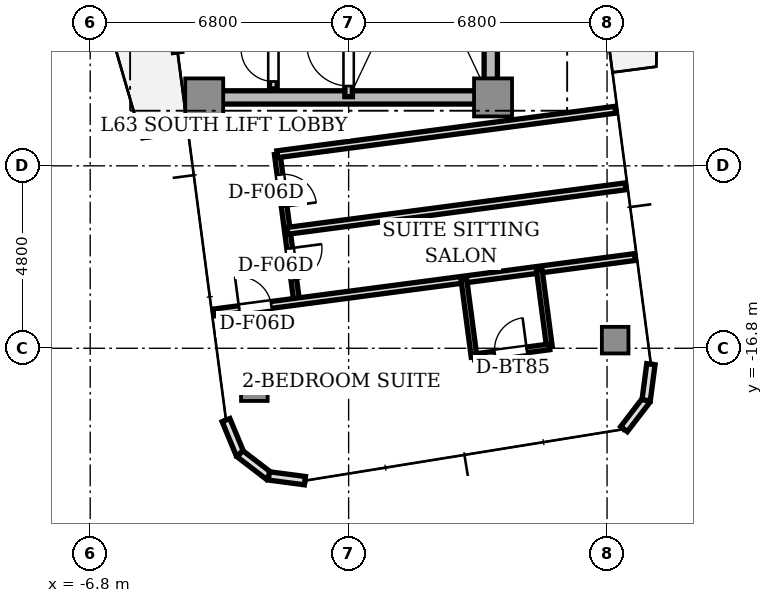
"""IFC4 building model, lengths in metres.
Left out: names, types, materials, properties, quantities, classifications, styles, units other than length and angle.
Written with IfcOpenShell. Run it as: python <this file> out.ifc"""

import sys

from ifc_helpers import new_model, si_unit, direction, frame, frame_2d, origin, origin_2d, place, context, subcontext, project, spatial, rectangle, extrude, source, transform, mapped, element, fill, save


model = new_model("IFC4")
c1 = context("Model", 3, precision=1e-05, world=origin(), true_north=direction((0.0, 1.0)))
c2 = subcontext(c1, "Body", "Model", "MODEL_VIEW")
j1 = project(units=[si_unit("LENGTHUNIT", "METRE"), si_unit("PLANEANGLEUNIT", "RADIAN")], contexts=[c1])
p1 = place(None, origin())
s1 = spatial("IfcSite", under=j1, at=p1, CompositionType="ELEMENT")
p2 = place(p1, origin())
s2 = spatial("IfcBuilding", under=s1, at=p2, CompositionType="ELEMENT")
p3 = place(p2, frame((0.0, 0.0, 226.6)))
s3 = spatial("IfcBuildingStorey", under=s2, at=p3, CompositionType="ELEMENT", Elevation=226.6)
p4 = place(p3, frame((-3.55, -10.2, 0.0), z_axis=(0.0, 0.0, 1.0), x_axis=(1.0, 0.0, 0.0)))
e1 = element("IfcWall", 1, at=p4, inside=s3, PredefinedType="SHEAR", context=c2, shape_type="SweptSolid", body=[
    extrude(rectangle(XDim=7.1, YDim=0.35, at=frame_2d((3.55, 0.0))), origin(), (0.0, 0.0, 1.0), 3.05),
])
p5 = place(p3, frame((3.74, -9.75, 0.0), z_axis=(0.0, 0.0, 1.0), x_axis=(0.0, 1.0, 0.0)))
e2 = element("IfcWall", 2, at=p5, inside=s3, PredefinedType="SHEAR", context=c2, shape_type="SweptSolid", body=[
    extrude(rectangle(XDim=6.9, YDim=0.35, at=frame_2d((3.45, 0.0))), origin(), (0.0, 0.0, 1.0), 3.05),
])
m1 = source(origin(), c2, "Body", "SweptSolid", [
    extrude(rectangle(XDim=1.0, YDim=1.0, at=origin_2d()), origin(), (0.0, 0.0, 1.0), 3.05),
])
for number, where, z_axis, x_axis in (
    (3, (-3.8, -10.2, 0.0), (0.0, 0.0, 1.0), (1.0, 0.0, 0.0)),
    (4, (3.8, -10.2, 0.0), (0.0, 0.0, 1.0), (1.0, 0.0, 0.0)),
):
    element("IfcColumn", number, at=place(p3, frame(where, z_axis=z_axis, x_axis=x_axis)), inside=s3, PredefinedType="COLUMN", context=c2, shape_type="MappedRepresentation", body=[
        mapped(m1, transform((0.0, 0.0, 0.0), scale=1.0)),
    ])
m2 = source(origin(), c2, "Body", "SweptSolid", [
    extrude(rectangle(XDim=0.7, YDim=0.7, at=origin_2d()), origin(), (0.0, 0.0, 1.0), 3.05),
])
for number, where, z_axis, x_axis in (
    (5, (-2.481, -17.836, 0.0), (0.0, 0.0, 1.0), (1.0, 0.0, 0.0)),
    (6, (7.013, -16.586, 0.0), (0.0, 0.0, 1.0), (1.0, 0.0, 0.0)),
):
    element("IfcColumn", number, at=place(p3, frame(where, z_axis=z_axis, x_axis=x_axis)), inside=s3, PredefinedType="COLUMN", context=c2, shape_type="MappedRepresentation", body=[
        mapped(m2, transform((0.0, 0.0, 0.0), scale=1.0)),
    ])
p6 = place(p3, frame((-3.226, -18.691, 0.0), z_axis=(0.0, 0.0, 1.0), x_axis=(0.382441868588, -0.923979554509, 0.0)))
e7 = element("IfcWall", 7, at=p6, inside=s3, PredefinedType="STANDARD", context=c2, shape_type="SweptSolid", body=[
    extrude(rectangle(XDim=0.958, YDim=0.22, at=frame_2d((0.479, 0.0))), origin(), (0.0, 0.0, 1.0), 3.05),
])
p7 = place(p3, frame((-2.86, -19.576, 0.0), z_axis=(0.0, 0.0, 1.0), x_axis=(0.79343813584, -0.60865090536, 0.0)))
e8 = element("IfcWall", 8, at=p7, inside=s3, PredefinedType="STANDARD", context=c2, shape_type="SweptSolid", body=[
    extrude(rectangle(XDim=0.958, YDim=0.22, at=frame_2d((0.479, 0.0))), origin(), (0.0, 0.0, 1.0), 3.05),
])
for number, where, z_axis, x_axis in (
    (9, (-2.1, -20.159, 0.0), (0.0, 0.0, 1.0), (0.991, -0.131, 0.0)),
    (10, (7.246, -18.928, 0.0), (0.0, 0.0, 1.0), (0.609, 0.793, 0.0)),
):
    element("IfcWall", number, at=place(p3, frame(where, z_axis=z_axis, x_axis=x_axis)), inside=s3, PredefinedType="STANDARD", context=c2, shape_type="SweptSolid", body=[
        extrude(rectangle(XDim=0.958, YDim=0.22, at=frame_2d((0.479, 0.0))), origin(), (0.0, 0.0, 1.0), 3.05),
    ])
p8 = place(p3, frame((7.829, -18.169, 0.0), z_axis=(0.0, 0.0, 1.0), x_axis=(0.130527053476, 0.991444747987, 0.0)))
e11 = element("IfcWall", 11, at=p8, inside=s3, PredefinedType="STANDARD", context=c2, shape_type="SweptSolid", body=[
    extrude(rectangle(XDim=0.958, YDim=0.22, at=frame_2d((0.479, 0.0))), origin(), (0.0, 0.0, 1.0), 3.05),
])
p9 = place(p3, frame((0.0, -10.18, 0.0), z_axis=(0.0, 0.0, 1.0), x_axis=(0.0, 1.0, 0.0)))
e12 = element("IfcWall", 12, at=p9, inside=s3, PredefinedType="SOLIDWALL", context=c2, shape_type="SweptSolid", body=[
    extrude(rectangle(XDim=7.68, YDim=0.2, at=frame_2d((3.84, 0.0))), origin(), (0.0, 0.0, 1.0), 3.05),
])
p10 = place(p9, frame((0.28, 0.0, 0.0)))
e13 = element("IfcOpeningElement", 13, at=p10, cuts=e12, PredefinedType="OPENING", context=c2, shape_type="SweptSolid", body=[
    extrude(rectangle(XDim=1.1, YDim=2.15, at=frame_2d((0.55, 1.075))), frame((0.0, 0.11, 0.0), z_axis=(0.0, -1.0, 0.0), x_axis=(1.0, 0.0, 0.0)), (0.0, 0.0, 1.0), 0.22),
])
p11 = place(p3, frame((-1.98, -9.98, 0.0), z_axis=(0.0, 0.0, 1.0), x_axis=(0.0, 1.0, 0.0)))
e14 = element("IfcWall", 14, at=p11, inside=s3, PredefinedType="SOLIDWALL", context=c2, shape_type="SweptSolid", body=[
    extrude(rectangle(XDim=4.66, YDim=0.2, at=frame_2d((2.33, 0.0))), origin(), (0.0, 0.0, 1.0), 2.6),
])
p12 = place(p11, frame((0.2, 0.0, 0.0)))
e15 = element("IfcOpeningElement", 15, at=p12, cuts=e14, PredefinedType="OPENING", context=c2, shape_type="SweptSolid", body=[
    extrude(rectangle(XDim=0.85, YDim=2.1, at=frame_2d((0.425, 1.05))), frame((0.0, 0.11, 0.0), z_axis=(0.0, -1.0, 0.0), x_axis=(1.0, 0.0, 0.0)), (0.0, 0.0, 1.0), 0.22),
])
p13 = place(p3, frame((-1.877, -11.695, 0.0), z_axis=(0.0, 0.0, 1.0), x_axis=(0.130494890856, -0.991448981774, 0.0)))
e16 = element("IfcWall", 16, at=p13, inside=s3, PredefinedType="PARTITIONING", context=c2, shape_type="SweptSolid", body=[
    extrude(rectangle(XDim=3.91, YDim=0.15, at=frame_2d((1.955, 0.0))), origin(), (0.0, 0.0, 1.0), 2.6),
])
p14 = place(p13, frame((0.541, 0.0, 0.0)))
e17 = element("IfcOpeningElement", 17, at=p14, cuts=e16, PredefinedType="OPENING", context=c2, shape_type="SweptSolid", body=[
    extrude(rectangle(XDim=0.85, YDim=2.1, at=frame_2d((0.425, 1.05))), frame((0.0, 0.085, 0.0), z_axis=(0.0, -1.0, 0.0), x_axis=(1.0, 0.0, 0.0)), (0.0, 0.0, 1.0), 0.17),
])
p15 = place(p13, frame((2.497, 0.0, 0.0)))
e18 = element("IfcOpeningElement", 18, at=p15, cuts=e16, PredefinedType="OPENING", context=c2, shape_type="SweptSolid", body=[
    extrude(rectangle(XDim=0.85, YDim=2.1, at=frame_2d((0.425, 1.05))), frame((0.0, 0.085, 0.0), z_axis=(0.0, -1.0, 0.0), x_axis=(1.0, 0.0, 0.0)), (0.0, 0.0, 1.0), 0.17),
])
p16 = place(p3, frame((-1.877, -11.695, 0.0), z_axis=(0.0, 0.0, 1.0), x_axis=(0.991444386854, 0.130529796508, 0.0)))
e19 = element("IfcWall", 19, at=p16, inside=s3, PredefinedType="PARTITIONING", context=c2, shape_type="SweptSolid", body=[
    extrude(rectangle(XDim=8.976, YDim=0.18, at=frame_2d((4.488, 0.0))), origin(), (0.0, 0.0, 1.0), 2.6),
])
p17 = place(p3, frame((-1.612, -13.711, 0.0), z_axis=(0.0, 0.0, 1.0), x_axis=(0.991444850259, 0.130526276648, 0.0)))
e20 = element("IfcWall", 20, at=p17, inside=s3, PredefinedType="PARTITIONING", context=c2, shape_type="SweptSolid", body=[
    extrude(rectangle(XDim=8.976, YDim=0.18, at=frame_2d((4.488, 0.0))), origin(), (0.0, 0.0, 1.0), 2.6),
])
p18 = place(p3, frame((-3.548, -15.859, 0.0), z_axis=(0.0, 0.0, 1.0), x_axis=(0.991444998773, 0.130525148566, 0.0)))
e21 = element("IfcWall", 21, at=p18, inside=s3, PredefinedType="PARTITIONING", context=c2, shape_type="SweptSolid", body=[
    extrude(rectangle(XDim=11.176, YDim=0.18, at=frame_2d((5.588, 0.0))), origin(), (0.0, 0.0, 1.0), 2.6),
])
p19 = place(p18, frame((0.675, 0.0, 0.0)))
e22 = element("IfcOpeningElement", 22, at=p19, cuts=e21, PredefinedType="OPENING", context=c2, shape_type="SweptSolid", body=[
    extrude(rectangle(XDim=0.85, YDim=2.1, at=frame_2d((0.425, 1.05))), frame((0.0, 0.1, 0.0), z_axis=(0.0, -1.0, 0.0), x_axis=(1.0, 0.0, 0.0)), (0.0, 0.0, 1.0), 0.2),
])
p20 = place(p3, frame((5.016, -14.731, 0.0), z_axis=(0.0, 0.0, 1.0), x_axis=(0.130509958008, -0.991446998513, 0.0)))
e23 = element("IfcWall", 23, at=p20, inside=s3, PredefinedType="PARTITIONING", context=c2, shape_type="SweptSolid", body=[
    extrude(rectangle(XDim=2.05, YDim=0.15, at=frame_2d((1.025, 0.0))), origin(), (0.0, 0.0, 1.0), 2.6),
])
p21 = place(p3, frame((3.033, -14.992, 0.0), z_axis=(0.0, 0.0, 1.0), x_axis=(0.13052536781, -0.991444969909, 0.0)))
e24 = element("IfcWall", 24, at=p21, inside=s3, PredefinedType="PARTITIONING", context=c2, shape_type="SweptSolid", body=[
    extrude(rectangle(XDim=2.05, YDim=0.15, at=frame_2d((1.025, 0.0))), origin(), (0.0, 0.0, 1.0), 2.6),
])
p22 = place(p3, frame((3.3, -17.025, 0.0), z_axis=(0.0, 0.0, 1.0), x_axis=(0.991449308994, 0.130492404742, 0.0)))
e25 = element("IfcWall", 25, at=p22, inside=s3, PredefinedType="PARTITIONING", context=c2, shape_type="SweptSolid", body=[
    extrude(rectangle(XDim=2.0, YDim=0.15, at=frame_2d((1.0, 0.0))), origin(), (0.0, 0.0, 1.0), 2.57),
])
p23 = place(p22, frame((0.55, 0.0, 0.0)))
e26 = element("IfcOpeningElement", 26, at=p23, cuts=e25, PredefinedType="OPENING", context=c2, shape_type="SweptSolid", body=[
    extrude(rectangle(XDim=0.85, YDim=2.1, at=frame_2d((0.425, 1.05))), frame((0.0, 0.085, 0.0), z_axis=(0.0, -1.0, 0.0), x_axis=(1.0, 0.0, 0.0)), (0.0, 0.0, 1.0), 0.17),
])
m3 = source(origin(), c2, "Body", "SweptSolid", [
    extrude(rectangle(XDim=1.1, YDim=0.05, at=origin_2d()), origin(), (0.0, 0.0, 1.0), 2.15),
])
p24 = place(p10, frame((0.55, 0.0, 0.0)))
e27 = element("IfcDoor", 27, at=p24, inside=s3, OperationType="SINGLE_SWING_RIGHT", PredefinedType="DOOR", context=c2, shape_type="MappedRepresentation", body=[
    mapped(m3, transform((0.0, 0.0, 0.0), scale=1.0)),
])
fill(e13, e27)
m4 = source(origin(), c2, "Body", "SweptSolid", [
    extrude(rectangle(XDim=0.85, YDim=0.05, at=origin_2d()), origin(), (0.0, 0.0, 1.0), 2.1),
])
p25 = place(p12, frame((0.425, 0.0, 0.0)))
e28 = element("IfcDoor", 28, at=p25, inside=s3, OperationType="SINGLE_SWING_RIGHT", PredefinedType="DOOR", context=c2, shape_type="MappedRepresentation", body=[
    mapped(m4, transform((0.0, 0.0, 0.0), scale=1.0)),
])
fill(e15, e28)
p26 = place(p14, frame((0.425, 0.0, 0.0)))
e29 = element("IfcDoor", 29, at=p26, inside=s3, OperationType="SINGLE_SWING_RIGHT", PredefinedType="DOOR", context=c2, shape_type="MappedRepresentation", body=[
    mapped(m4, transform((0.0, 0.0, 0.0), scale=1.0)),
])
fill(e17, e29)
p27 = place(p15, frame((0.425, 0.0, 0.0)))
e30 = element("IfcDoor", 30, at=p27, inside=s3, OperationType="SINGLE_SWING_LEFT", PredefinedType="DOOR", context=c2, shape_type="MappedRepresentation", body=[
    mapped(m4, transform((0.0, 0.0, 0.0), scale=1.0)),
])
fill(e18, e30)
p28 = place(p23, frame((0.425, 0.0, 0.0)))
e31 = element("IfcDoor", 31, at=p28, inside=s3, OperationType="SINGLE_SWING_RIGHT", PredefinedType="DOOR", context=c2, shape_type="MappedRepresentation", body=[
    mapped(m4, transform((0.0, 0.0, 0.0), scale=1.0)),
])
fill(e26, e31)
p29 = place(p19, frame((0.425, 0.0, 0.0)))
e32 = element("IfcDoor", 32, at=p29, inside=s3, OperationType="SINGLE_SWING_LEFT", PredefinedType="DOOR", context=c2, shape_type="MappedRepresentation", body=[
    mapped(m4, transform((0.0, 0.0, 0.0), scale=1.0)),
])
fill(e22, e32)
save(model, sys.argv[1])
